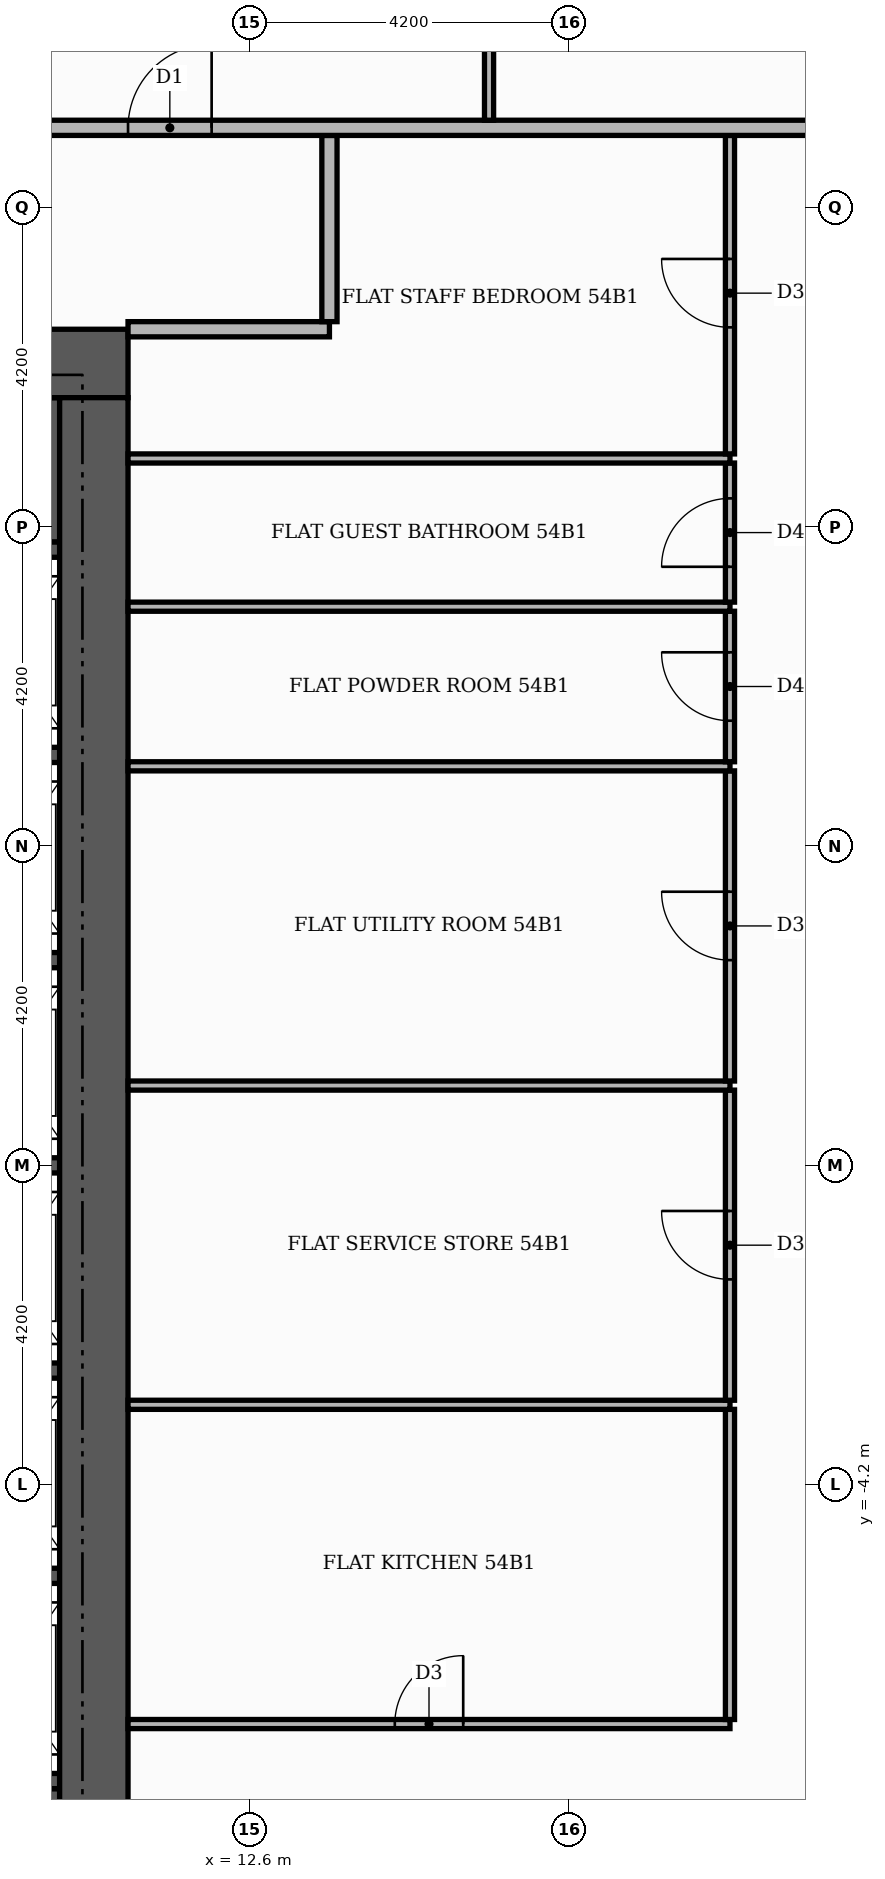
"""IFC4 building model, lengths in metres.
Left out: names, types, materials, properties, quantities, classifications, styles, units other than length and angle.
Written with IfcOpenShell. Run it as: python <this file> out.ifc"""

import sys

from ifc_helpers import new_model, si_unit, direction, frame, frame_2d, origin, place, context, subcontext, project, spatial, rectangle, extrude, element, fill, save


model = new_model("IFC4")
c1 = context("Model", 3, precision=1e-05, world=origin(), true_north=direction((0.0, 1.0)))
c2 = subcontext(c1, "Body", "Model", "MODEL_VIEW")
j1 = project(units=[si_unit("LENGTHUNIT", "METRE"), si_unit("PLANEANGLEUNIT", "RADIAN")], contexts=[c1])
p1 = place(None, origin())
s1 = spatial("IfcSite", under=j1, at=p1, CompositionType="ELEMENT")
p2 = place(p1, origin())
s2 = spatial("IfcBuilding", under=s1, at=p2, CompositionType="ELEMENT")
p3 = place(p2, frame((0.0, 0.0, 227.4)))
s3 = spatial("IfcBuildingStorey", under=s2, at=p3, CompositionType="ELEMENT", Elevation=227.4)
for number, where, z_axis, x_axis in (
    (1, (5.5, -9.15, 0.0), (0.0, 0.0, 1.0), (1.0, 0.0, 0.0)),
    (2, (5.5, 9.15, 0.0), (0.0, 0.0, 1.0), (1.0, 0.0, 0.0)),
):
    element("IfcWall", number, at=place(p3, frame(where, z_axis=z_axis, x_axis=x_axis)), inside=s3, PredefinedType="SHEAR", context=c2, shape_type="SweptSolid", body=[
        extrude(rectangle(XDim=4.6, YDim=1.9, at=frame_2d((2.3, 0.0))), origin(), (0.0, 0.0, 1.0), 3.48),
    ])
for number, where, z_axis, x_axis in (
    (3, (8.1, -8.1, 0.0), (0.0, 0.0, 1.0), (1.0, 0.0, 0.0)),
    (4, (8.1, -5.4, 0.0), (0.0, 0.0, 1.0), (1.0, 0.0, 0.0)),
    (5, (8.1, -2.7, 0.0), (0.0, 0.0, 1.0), (1.0, 0.0, 0.0)),
    (6, (8.1, 0.0, 0.0), (0.0, 0.0, 1.0), (1.0, 0.0, 0.0)),
    (7, (8.1, 2.7, 0.0), (0.0, 0.0, 1.0), (1.0, 0.0, 0.0)),
    (8, (8.1, 5.4, 0.0), (0.0, 0.0, 1.0), (1.0, 0.0, 0.0)),
    (9, (8.1, 8.1, 0.0), (0.0, 0.0, 1.0), (1.0, 0.0, 0.0)),
):
    element("IfcWall", number, at=place(p3, frame(where, z_axis=z_axis, x_axis=x_axis)), inside=s3, PredefinedType="SHEAR", context=c2, shape_type="SweptSolid", body=[
        extrude(rectangle(XDim=2.0, YDim=0.2, at=frame_2d((1.0, 0.0))), origin(), (0.0, 0.0, 1.0), 3.48),
    ])
p4 = place(p3, frame((-11.0, 10.55, 0.0), z_axis=(0.0, 0.0, 1.0), x_axis=(1.0, 0.0, 0.0)))
e10 = element("IfcWall", 10, at=p4, inside=s3, PredefinedType="SHEAR", context=c2, shape_type="SweptSolid", body=[
    extrude(rectangle(XDim=22.0, YDim=0.9, at=frame_2d((11.0, 0.0))), origin(), (0.0, 0.0, 1.0), 3.48),
])
p5 = place(p4, frame((13.3, 0.0, 0.0)))
e11 = element("IfcOpeningElement", 11, at=p5, cuts=e10, PredefinedType="OPENING", context=c2, shape_type="SweptSolid", body=[
    extrude(rectangle(XDim=1.8, YDim=2.2, at=frame_2d((0.9, 1.1))), frame((0.0, 0.46, 0.0), z_axis=(0.0, -1.0, 0.0), x_axis=(1.0, 0.0, 0.0)), (0.0, 0.0, 1.0), 0.92),
])
p6 = place(p3, frame((10.55, -10.1, 0.0), z_axis=(0.0, 0.0, 1.0), x_axis=(0.0, 1.0, 0.0)))
e12 = element("IfcWall", 12, at=p6, inside=s3, PredefinedType="SHEAR", context=c2, shape_type="SweptSolid", body=[
    extrude(rectangle(XDim=20.2, YDim=0.9, at=frame_2d((10.1, 0.0))), origin(), (0.0, 0.0, 1.0), 3.48),
])
p7 = place(p3, frame((11.0, -7.35, 0.0), z_axis=(0.0, 0.0, 1.0), x_axis=(1.0, 0.0, 0.0)))
e13 = element("IfcWall", 13, at=p7, inside=s3, PredefinedType="PARTITIONING", context=c2, shape_type="SweptSolid", body=[
    extrude(rectangle(XDim=7.92, YDim=0.12, at=frame_2d((3.96, 0.0))), origin(), (0.0, 0.0, 1.0), 3.48),
])
p8 = place(p7, frame((3.51, 0.0, 0.0)))
e14 = element("IfcOpeningElement", 14, at=p8, cuts=e13, PredefinedType="OPENING", context=c2, shape_type="SweptSolid", body=[
    extrude(rectangle(XDim=0.9, YDim=2.1, at=frame_2d((0.45, 1.05))), frame((0.0, 0.07, 0.0), z_axis=(0.0, -1.0, 0.0), x_axis=(1.0, 0.0, 0.0)), (0.0, 0.0, 1.0), 0.14),
])
p9 = place(p3, frame((18.92, -7.29, 0.0), z_axis=(0.0, 0.0, 1.0), x_axis=(0.0, 1.0, 0.0)))
e15 = element("IfcWall", 15, at=p9, inside=s3, PredefinedType="PARTITIONING", context=c2, shape_type="SweptSolid", body=[
    extrude(rectangle(XDim=4.08, YDim=0.12, at=frame_2d((2.04, 0.0))), origin(), (0.0, 0.0, 1.0), 3.48),
])
p10 = place(p3, frame((11.0, -3.15, 0.0), z_axis=(0.0, 0.0, 1.0), x_axis=(1.0, 0.0, 0.0)))
e16 = element("IfcWall", 16, at=p10, inside=s3, PredefinedType="PARTITIONING", context=c2, shape_type="SweptSolid", body=[
    extrude(rectangle(XDim=7.92, YDim=0.12, at=frame_2d((3.96, 0.0))), origin(), (0.0, 0.0, 1.0), 3.48),
])
p11 = place(p3, frame((18.92, -3.09, 0.0), z_axis=(0.0, 0.0, 1.0), x_axis=(0.0, 1.0, 0.0)))
e17 = element("IfcWall", 17, at=p11, inside=s3, PredefinedType="PARTITIONING", context=c2, shape_type="SweptSolid", body=[
    extrude(rectangle(XDim=4.08, YDim=0.12, at=frame_2d((2.04, 0.0))), origin(), (0.0, 0.0, 1.0), 3.48),
])
p12 = place(p11, frame((1.59, 0.0, 0.0)))
e18 = element("IfcOpeningElement", 18, at=p12, cuts=e17, PredefinedType="OPENING", context=c2, shape_type="SweptSolid", body=[
    extrude(rectangle(XDim=0.9, YDim=2.1, at=frame_2d((0.45, 1.05))), frame((0.0, 0.07, 0.0), z_axis=(0.0, -1.0, 0.0), x_axis=(1.0, 0.0, 0.0)), (0.0, 0.0, 1.0), 0.14),
])
p13 = place(p3, frame((11.0, 1.05, 0.0), z_axis=(0.0, 0.0, 1.0), x_axis=(1.0, 0.0, 0.0)))
e19 = element("IfcWall", 19, at=p13, inside=s3, PredefinedType="PARTITIONING", context=c2, shape_type="SweptSolid", body=[
    extrude(rectangle(XDim=7.92, YDim=0.12, at=frame_2d((3.96, 0.0))), origin(), (0.0, 0.0, 1.0), 3.48),
])
p14 = place(p3, frame((18.92, 1.11, 0.0), z_axis=(0.0, 0.0, 1.0), x_axis=(0.0, 1.0, 0.0)))
e20 = element("IfcWall", 20, at=p14, inside=s3, PredefinedType="PARTITIONING", context=c2, shape_type="SweptSolid", body=[
    extrude(rectangle(XDim=4.08, YDim=0.12, at=frame_2d((2.04, 0.0))), origin(), (0.0, 0.0, 1.0), 3.48),
])
p15 = place(p14, frame((1.59, 0.0, 0.0)))
e21 = element("IfcOpeningElement", 21, at=p15, cuts=e20, PredefinedType="OPENING", context=c2, shape_type="SweptSolid", body=[
    extrude(rectangle(XDim=0.9, YDim=2.1, at=frame_2d((0.45, 1.05))), frame((0.0, 0.07, 0.0), z_axis=(0.0, -1.0, 0.0), x_axis=(1.0, 0.0, 0.0)), (0.0, 0.0, 1.0), 0.14),
])
p16 = place(p3, frame((11.0, 5.25, 0.0), z_axis=(0.0, 0.0, 1.0), x_axis=(1.0, 0.0, 0.0)))
e22 = element("IfcWall", 22, at=p16, inside=s3, PredefinedType="PARTITIONING", context=c2, shape_type="SweptSolid", body=[
    extrude(rectangle(XDim=7.92, YDim=0.12, at=frame_2d((3.96, 0.0))), origin(), (0.0, 0.0, 1.0), 3.48),
])
p17 = place(p3, frame((18.92, 5.31, 0.0), z_axis=(0.0, 0.0, 1.0), x_axis=(0.0, 1.0, 0.0)))
e23 = element("IfcWall", 23, at=p17, inside=s3, PredefinedType="PARTITIONING", context=c2, shape_type="SweptSolid", body=[
    extrude(rectangle(XDim=1.98, YDim=0.12, at=frame_2d((0.99, 0.0))), origin(), (0.0, 0.0, 1.0), 3.48),
])
p18 = place(p17, frame((0.54, 0.0, 0.0)))
e24 = element("IfcOpeningElement", 24, at=p18, cuts=e23, PredefinedType="OPENING", context=c2, shape_type="SweptSolid", body=[
    extrude(rectangle(XDim=0.9, YDim=2.1, at=frame_2d((0.45, 1.05))), frame((0.0, 0.07, 0.0), z_axis=(0.0, -1.0, 0.0), x_axis=(1.0, 0.0, 0.0)), (0.0, 0.0, 1.0), 0.14),
])
p19 = place(p3, frame((11.0, 7.35, 0.0), z_axis=(0.0, 0.0, 1.0), x_axis=(1.0, 0.0, 0.0)))
e25 = element("IfcWall", 25, at=p19, inside=s3, PredefinedType="PARTITIONING", context=c2, shape_type="SweptSolid", body=[
    extrude(rectangle(XDim=7.92, YDim=0.12, at=frame_2d((3.96, 0.0))), origin(), (0.0, 0.0, 1.0), 3.48),
])
p20 = place(p3, frame((18.92, 7.41, 0.0), z_axis=(0.0, 0.0, 1.0), x_axis=(0.0, 1.0, 0.0)))
e26 = element("IfcWall", 26, at=p20, inside=s3, PredefinedType="PARTITIONING", context=c2, shape_type="SweptSolid", body=[
    extrude(rectangle(XDim=1.83, YDim=0.12, at=frame_2d((0.915, 0.0))), origin(), (0.0, 0.0, 1.0), 3.48),
])
p21 = place(p20, frame((0.465, 0.0, 0.0)))
e27 = element("IfcOpeningElement", 27, at=p21, cuts=e26, PredefinedType="OPENING", context=c2, shape_type="SweptSolid", body=[
    extrude(rectangle(XDim=0.9, YDim=2.1, at=frame_2d((0.45, 1.05))), frame((0.0, 0.07, 0.0), z_axis=(0.0, -1.0, 0.0), x_axis=(1.0, 0.0, 0.0)), (0.0, 0.0, 1.0), 0.14),
])
p22 = place(p3, frame((11.0, 9.3, 0.0), z_axis=(0.0, 0.0, 1.0), x_axis=(1.0, 0.0, 0.0)))
e28 = element("IfcWall", 28, at=p22, inside=s3, PredefinedType="PARTITIONING", context=c2, shape_type="SweptSolid", body=[
    extrude(rectangle(XDim=7.92, YDim=0.12, at=frame_2d((3.96, 0.0))), origin(), (0.0, 0.0, 1.0), 3.48),
])
p23 = place(p3, frame((18.92, 9.36, 0.0), z_axis=(0.0, 0.0, 1.0), x_axis=(0.0, 1.0, 0.0)))
e29 = element("IfcWall", 29, at=p23, inside=s3, PredefinedType="PARTITIONING", context=c2, shape_type="SweptSolid", body=[
    extrude(rectangle(XDim=4.19, YDim=0.12, at=frame_2d((2.095, 0.0))), origin(), (0.0, 0.0, 1.0), 3.48),
])
p24 = place(p23, frame((1.665, 0.0, 0.0)))
e30 = element("IfcOpeningElement", 30, at=p24, cuts=e29, PredefinedType="OPENING", context=c2, shape_type="SweptSolid", body=[
    extrude(rectangle(XDim=0.9, YDim=2.1, at=frame_2d((0.45, 1.05))), frame((0.0, 0.07, 0.0), z_axis=(0.0, -1.0, 0.0), x_axis=(1.0, 0.0, 0.0)), (0.0, 0.0, 1.0), 0.14),
])
p25 = place(p3, frame((11.0, 11.0, 0.0), z_axis=(0.0, 0.0, 1.0), x_axis=(1.0, 0.0, 0.0)))
e31 = element("IfcWall", 31, at=p25, inside=s3, PredefinedType="PARTITIONING", context=c2, shape_type="SweptSolid", body=[
    extrude(rectangle(XDim=2.65, YDim=0.2, at=frame_2d((1.325, 0.0))), origin(), (0.0, 0.0, 1.0), 3.48),
])
p26 = place(p3, frame((13.65, 11.1, 0.0), z_axis=(0.0, 0.0, 1.0), x_axis=(0.0, 1.0, 0.0)))
e32 = element("IfcWall", 32, at=p26, inside=s3, PredefinedType="PARTITIONING", context=c2, shape_type="SweptSolid", body=[
    extrude(rectangle(XDim=2.45, YDim=0.2, at=frame_2d((1.225, 0.0))), origin(), (0.0, 0.0, 1.0), 3.48),
])
p27 = place(p3, frame((-13.65, 13.65, 0.0), z_axis=(0.0, 0.0, 1.0), x_axis=(1.0, 0.0, 0.0)))
e33 = element("IfcWall", 33, at=p27, inside=s3, PredefinedType="PARTITIONING", context=c2, shape_type="SweptSolid", body=[
    extrude(rectangle(XDim=34.07, YDim=0.2, at=frame_2d((17.035, 0.0))), origin(), (0.0, 0.0, 1.0), 3.48),
])
p28 = place(p27, frame((24.65, 0.0, 0.0)))
e34 = element("IfcOpeningElement", 34, at=p28, cuts=e33, PredefinedType="OPENING", context=c2, shape_type="SweptSolid", body=[
    extrude(rectangle(XDim=1.1, YDim=2.4, at=frame_2d((0.55, 1.2))), frame((0.0, 0.11, 0.0), z_axis=(0.0, -1.0, 0.0), x_axis=(1.0, 0.0, 0.0)), (0.0, 0.0, 1.0), 0.22),
])
p29 = place(p3, frame((15.75, 13.75, 0.0), z_axis=(0.0, 0.0, 1.0), x_axis=(0.0, 1.0, 0.0)))
e35 = element("IfcWall", 35, at=p29, inside=s3, PredefinedType="PARTITIONING", context=c2, shape_type="SweptSolid", body=[
    extrude(rectangle(XDim=6.01, YDim=0.12, at=frame_2d((3.005, 0.0))), origin(), (0.0, 0.0, 1.0), 3.48),
])
p30 = place(p29, frame((2.535, 0.0, 0.0)))
e36 = element("IfcOpeningElement", 36, at=p30, cuts=e35, PredefinedType="OPENING", context=c2, shape_type="SweptSolid", body=[
    extrude(rectangle(XDim=0.9, YDim=2.1, at=frame_2d((0.45, 1.05))), frame((0.0, 0.07, 0.0), z_axis=(0.0, -1.0, 0.0), x_axis=(1.0, 0.0, 0.0)), (0.0, 0.0, 1.0), 0.14),
])
p31 = place(p8, origin())
e37 = element("IfcDoor", 37, at=p31, inside=s3, OperationType="SINGLE_SWING_RIGHT", PredefinedType="DOOR", context=c2, shape_type="SweptSolid", body=[
    extrude(rectangle(XDim=0.9, YDim=2.1, at=frame_2d((0.45, 1.05))), frame((0.0, 0.025, 0.0), z_axis=(0.0, -1.0, 0.0), x_axis=(1.0, 0.0, 0.0)), (0.0, 0.0, 1.0), 0.05),
])
fill(e14, e37)
p32 = place(p12, origin())
e38 = element("IfcDoor", 38, at=p32, inside=s3, OperationType="SINGLE_SWING_RIGHT", PredefinedType="DOOR", context=c2, shape_type="SweptSolid", body=[
    extrude(rectangle(XDim=0.9, YDim=2.1, at=frame_2d((0.45, 1.05))), frame((0.0, 0.025, 0.0), z_axis=(0.0, -1.0, 0.0), x_axis=(1.0, 0.0, 0.0)), (0.0, 0.0, 1.0), 0.05),
])
fill(e18, e38)
p33 = place(p15, origin())
e39 = element("IfcDoor", 39, at=p33, inside=s3, OperationType="SINGLE_SWING_RIGHT", PredefinedType="DOOR", context=c2, shape_type="SweptSolid", body=[
    extrude(rectangle(XDim=0.9, YDim=2.1, at=frame_2d((0.45, 1.05))), frame((0.0, 0.025, 0.0), z_axis=(0.0, -1.0, 0.0), x_axis=(1.0, 0.0, 0.0)), (0.0, 0.0, 1.0), 0.05),
])
fill(e21, e39)
p34 = place(p18, origin())
e40 = element("IfcDoor", 40, at=p34, inside=s3, OperationType="SINGLE_SWING_RIGHT", PredefinedType="DOOR", context=c2, shape_type="SweptSolid", body=[
    extrude(rectangle(XDim=0.9, YDim=2.1, at=frame_2d((0.45, 1.05))), frame((0.0, 0.025, 0.0), z_axis=(0.0, -1.0, 0.0), x_axis=(1.0, 0.0, 0.0)), (0.0, 0.0, 1.0), 0.05),
])
fill(e24, e40)
p35 = place(p21, origin())
e41 = element("IfcDoor", 41, at=p35, inside=s3, OperationType="SINGLE_SWING_LEFT", PredefinedType="DOOR", context=c2, shape_type="SweptSolid", body=[
    extrude(rectangle(XDim=0.9, YDim=2.1, at=frame_2d((0.45, 1.05))), frame((0.0, 0.025, 0.0), z_axis=(0.0, -1.0, 0.0), x_axis=(1.0, 0.0, 0.0)), (0.0, 0.0, 1.0), 0.05),
])
fill(e27, e41)
p36 = place(p24, origin())
e42 = element("IfcDoor", 42, at=p36, inside=s3, OperationType="SINGLE_SWING_RIGHT", PredefinedType="DOOR", context=c2, shape_type="SweptSolid", body=[
    extrude(rectangle(XDim=0.9, YDim=2.1, at=frame_2d((0.45, 1.05))), frame((0.0, 0.025, 0.0), z_axis=(0.0, -1.0, 0.0), x_axis=(1.0, 0.0, 0.0)), (0.0, 0.0, 1.0), 0.05),
])
fill(e30, e42)
p37 = place(p28, origin())
e43 = element("IfcDoor", 43, at=p37, inside=s3, OperationType="SINGLE_SWING_RIGHT", PredefinedType="DOOR", context=c2, shape_type="SweptSolid", body=[
    extrude(rectangle(XDim=1.1, YDim=2.4, at=frame_2d((0.55, 1.2))), frame((0.0, 0.025, 0.0), z_axis=(0.0, -1.0, 0.0), x_axis=(1.0, 0.0, 0.0)), (0.0, 0.0, 1.0), 0.05),
])
fill(e34, e43)
save(model, sys.argv[1])
